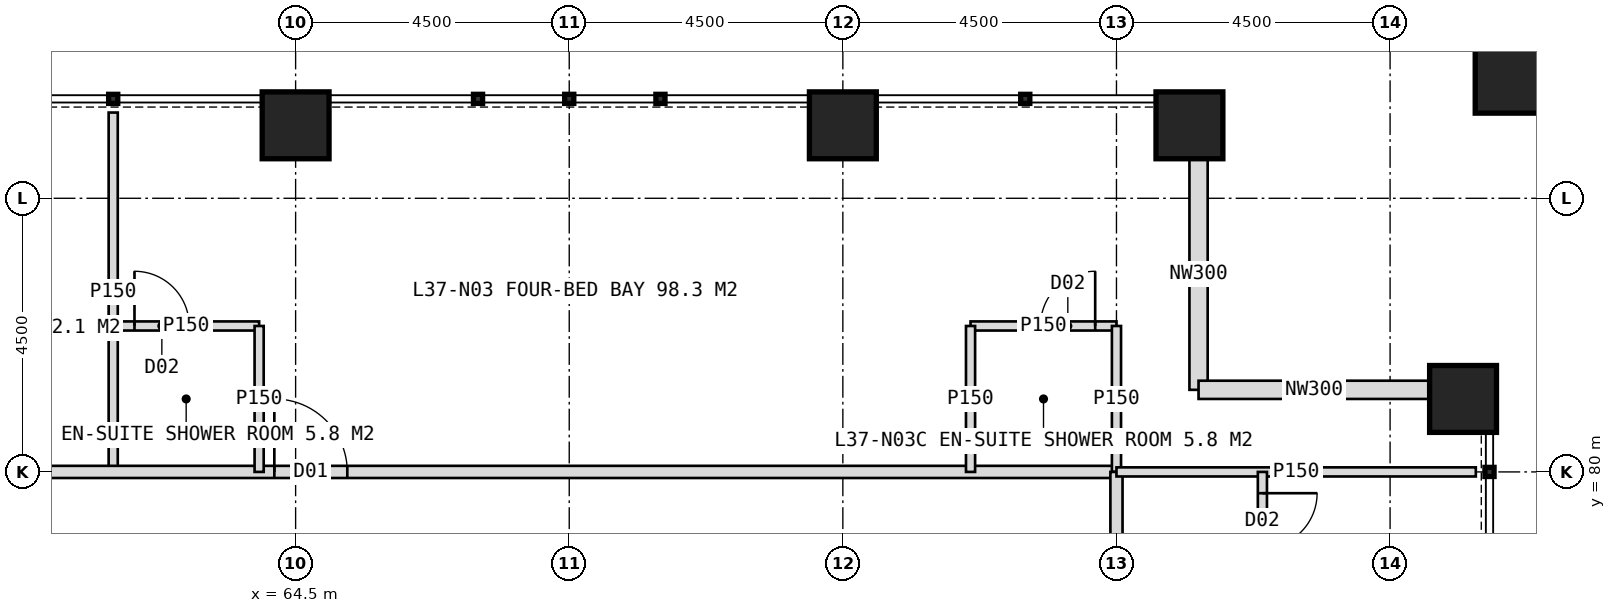
"""IFC4 building model, lengths in metres.
Left out: names, types, materials, properties, quantities, classifications, styles, units other than length and angle.
Written with IfcOpenShell. Run it as: python <this file> out.ifc"""

import sys

from ifc_helpers import new_model, si_unit, direction, frame, frame_2d, origin, origin_2d, place, context, subcontext, project, spatial, rectangle, hollow_rectangle, extrude, element, fill, save


model = new_model("IFC4")
c1 = context("Model", 3, precision=1e-05, world=origin(), true_north=direction((0.0, 1.0)))
c2 = subcontext(c1, "Body", "Model", "MODEL_VIEW")
j1 = project(units=[si_unit("LENGTHUNIT", "METRE"), si_unit("PLANEANGLEUNIT", "RADIAN")], contexts=[c1])
p1 = place(None, origin())
s1 = spatial("IfcSite", under=j1, at=p1, CompositionType="ELEMENT")
p2 = place(p1, origin())
s2 = spatial("IfcBuilding", under=s1, at=p2, CompositionType="ELEMENT")
p3 = place(p2, frame((0.0, 0.0, 156.0)))
s3 = spatial("IfcBuildingStorey", under=s2, at=p3, CompositionType="ELEMENT", Elevation=156.0)
for number, where, z_axis, x_axis in (
    (1, (64.5, 85.7, 0.0), (0.0, 0.0, 1.0), (1.0, 0.0, 0.0)),
    (2, (73.5, 85.7, 0.0), (0.0, 0.0, 1.0), (1.0, 0.0, 0.0)),
    (3, (79.2, 85.7, 0.0), (0.0, 0.0, 1.0), (1.0, 0.0, 0.0)),
    (4, (83.7, 81.2, 0.0), (0.0, 0.0, 1.0), (1.0, 0.0, 0.0)),
):
    element("IfcColumn", number, at=place(p3, frame(where, z_axis=z_axis, x_axis=x_axis)), inside=s3, PredefinedType="COLUMN", context=c2, shape_type="SweptSolid", body=[
        extrude(hollow_rectangle(XDim=1.1, YDim=1.1, WallThickness=0.1, at=origin_2d()), origin(), (0.0, 0.0, 1.0), 4.0),
    ])
p4 = place(p3, frame((84.6, 86.6, 0.0), z_axis=(0.0, 0.0, 1.0), x_axis=(1.0, 0.0, 0.0)))
e5 = element("IfcColumn", 5, at=p4, inside=s3, PredefinedType="COLUMN", context=c2, shape_type="SweptSolid", body=[
    extrude(hollow_rectangle(XDim=1.4, YDim=1.4, WallThickness=0.08, at=origin_2d()), origin(), (0.0, 0.0, 1.0), 4.0),
])
for number, where, z_axis, x_axis in (
    (6, (79.35, 85.15, 0.0), (0.0, 0.0, 1.0), (0.0, -1.0, 0.0)),
    (7, (79.35, 81.35, 0.0), (0.0, 0.0, 1.0), (1.0, 0.0, 0.0)),
):
    element("IfcWall", number, at=place(p3, frame(where, z_axis=z_axis, x_axis=x_axis)), inside=s3, PredefinedType="ELEMENTEDWALL", context=c2, shape_type="SweptSolid", body=[
        extrude(rectangle(XDim=3.8, YDim=0.3, at=frame_2d((1.9, 0.0))), origin(), (0.0, 0.0, 1.0), 4.0),
    ])
p5 = place(p3, frame((61.5, 80.0, 0.0), z_axis=(0.0, 0.0, 1.0), x_axis=(0.0, 1.0, 0.0)))
e8 = element("IfcWall", 8, at=p5, inside=s3, PredefinedType="PARTITIONING", context=c2, shape_type="SweptSolid", body=[
    extrude(rectangle(XDim=5.91, YDim=0.15, at=frame_2d((2.955, 0.0))), origin(), (0.0, 0.0, 1.0), 3.75),
])
p6 = place(p3, frame((42.0, 80.0, 0.0), z_axis=(0.0, 0.0, 1.0), x_axis=(1.0, 0.0, 0.0)))
e9 = element("IfcWall", 9, at=p6, inside=s3, PredefinedType="PARTITIONING", context=c2, shape_type="SweptSolid", body=[
    extrude(rectangle(XDim=36.0, YDim=0.2, at=frame_2d((18.0, 0.0))), origin(), (0.0, 0.0, 1.0), 3.75),
])
p7 = place(p6, frame((3.25, 0.0, 0.0)))
e10 = element("IfcOpeningElement", 10, at=p7, cuts=e9, PredefinedType="OPENING", context=c2, shape_type="SweptSolid", body=[
    extrude(rectangle(XDim=1.2, YDim=2.2, at=frame_2d((0.6, 1.1))), frame((0.0, 0.11, 0.0), z_axis=(0.0, -1.0, 0.0), x_axis=(1.0, 0.0, 0.0)), (0.0, 0.0, 1.0), 0.22),
])
p8 = place(p6, frame((13.75, 0.0, 0.0)))
e11 = element("IfcOpeningElement", 11, at=p8, cuts=e9, PredefinedType="OPENING", context=c2, shape_type="SweptSolid", body=[
    extrude(rectangle(XDim=1.0, YDim=2.1, at=frame_2d((0.5, 1.05))), frame((0.0, 0.11, 0.0), z_axis=(0.0, -1.0, 0.0), x_axis=(1.0, 0.0, 0.0)), (0.0, 0.0, 1.0), 0.22),
])
p9 = place(p6, frame((22.15, 0.0, 0.0)))
e12 = element("IfcOpeningElement", 12, at=p9, cuts=e9, PredefinedType="OPENING", context=c2, shape_type="SweptSolid", body=[
    extrude(rectangle(XDim=1.2, YDim=2.2, at=frame_2d((0.6, 1.1))), frame((0.0, 0.11, 0.0), z_axis=(0.0, -1.0, 0.0), x_axis=(1.0, 0.0, 0.0)), (0.0, 0.0, 1.0), 0.22),
])
p10 = place(p3, frame((61.5, 82.4, 0.0), z_axis=(0.0, 0.0, 1.0), x_axis=(1.0, 0.0, 0.0)))
e13 = element("IfcWall", 13, at=p10, inside=s3, PredefinedType="PARTITIONING", context=c2, shape_type="SweptSolid", body=[
    extrude(rectangle(XDim=2.4, YDim=0.15, at=frame_2d((1.2, 0.0))), origin(), (0.0, 0.0, 1.0), 3.75),
])
p11 = place(p10, frame((0.35, 0.0, 0.0)))
e14 = element("IfcOpeningElement", 14, at=p11, cuts=e13, PredefinedType="OPENING", context=c2, shape_type="SweptSolid", body=[
    extrude(rectangle(XDim=0.9, YDim=2.1, at=frame_2d((0.45, 1.05))), frame((0.0, 0.085, 0.0), z_axis=(0.0, -1.0, 0.0), x_axis=(1.0, 0.0, 0.0)), (0.0, 0.0, 1.0), 0.17),
])
p12 = place(p3, frame((63.9, 80.0, 0.0), z_axis=(0.0, 0.0, 1.0), x_axis=(0.0, 1.0, 0.0)))
e15 = element("IfcWall", 15, at=p12, inside=s3, PredefinedType="PARTITIONING", context=c2, shape_type="SweptSolid", body=[
    extrude(rectangle(XDim=2.4, YDim=0.15, at=frame_2d((1.2, 0.0))), origin(), (0.0, 0.0, 1.0), 3.75),
])
p13 = place(p3, frame((75.6, 82.4, 0.0), z_axis=(0.0, 0.0, 1.0), x_axis=(1.0, 0.0, 0.0)))
e16 = element("IfcWall", 16, at=p13, inside=s3, PredefinedType="PARTITIONING", context=c2, shape_type="SweptSolid", body=[
    extrude(rectangle(XDim=2.4, YDim=0.15, at=frame_2d((1.2, 0.0))), origin(), (0.0, 0.0, 1.0), 3.75),
])
p14 = place(p13, frame((1.15, 0.0, 0.0)))
e17 = element("IfcOpeningElement", 17, at=p14, cuts=e16, PredefinedType="OPENING", context=c2, shape_type="SweptSolid", body=[
    extrude(rectangle(XDim=0.9, YDim=2.1, at=frame_2d((0.45, 1.05))), frame((0.0, 0.085, 0.0), z_axis=(0.0, -1.0, 0.0), x_axis=(1.0, 0.0, 0.0)), (0.0, 0.0, 1.0), 0.17),
])
for number, where, z_axis, x_axis in (
    (18, (75.6, 80.0, 0.0), (0.0, 0.0, 1.0), (0.0, 1.0, 0.0)),
    (19, (78.0, 80.0, 0.0), (0.0, 0.0, 1.0), (0.0, 1.0, 0.0)),
):
    element("IfcWall", number, at=place(p3, frame(where, z_axis=z_axis, x_axis=x_axis)), inside=s3, PredefinedType="PARTITIONING", context=c2, shape_type="SweptSolid", body=[
        extrude(rectangle(XDim=2.4, YDim=0.15, at=frame_2d((1.2, 0.0))), origin(), (0.0, 0.0, 1.0), 3.75),
    ])
p15 = place(p3, frame((78.0, 80.0, 0.0), z_axis=(0.0, 0.0, 1.0), x_axis=(0.0, -1.0, 0.0)))
e20 = element("IfcWall", 20, at=p15, inside=s3, PredefinedType="PARTITIONING", context=c2, shape_type="SweptSolid", body=[
    extrude(rectangle(XDim=36.0, YDim=0.2, at=frame_2d((18.0, 0.0))), origin(), (0.0, 0.0, 1.0), 3.75),
])
p16 = place(p15, frame((3.25, 0.0, 0.0)))
e21 = element("IfcOpeningElement", 21, at=p16, cuts=e20, PredefinedType="OPENING", context=c2, shape_type="SweptSolid", body=[
    extrude(rectangle(XDim=1.2, YDim=2.2, at=frame_2d((0.6, 1.1))), frame((0.0, 0.11, 0.0), z_axis=(0.0, -1.0, 0.0), x_axis=(1.0, 0.0, 0.0)), (0.0, 0.0, 1.0), 0.22),
])
p17 = place(p15, frame((10.75, 0.0, 0.0)))
e22 = element("IfcOpeningElement", 22, at=p17, cuts=e20, PredefinedType="OPENING", context=c2, shape_type="SweptSolid", body=[
    extrude(rectangle(XDim=1.2, YDim=2.2, at=frame_2d((0.6, 1.1))), frame((0.0, 0.11, 0.0), z_axis=(0.0, -1.0, 0.0), x_axis=(1.0, 0.0, 0.0)), (0.0, 0.0, 1.0), 0.22),
])
p18 = place(p15, frame((21.25, 0.0, 0.0)))
e23 = element("IfcOpeningElement", 23, at=p18, cuts=e20, PredefinedType="OPENING", context=c2, shape_type="SweptSolid", body=[
    extrude(rectangle(XDim=1.2, YDim=2.2, at=frame_2d((0.6, 1.1))), frame((0.0, 0.11, 0.0), z_axis=(0.0, -1.0, 0.0), x_axis=(1.0, 0.0, 0.0)), (0.0, 0.0, 1.0), 0.22),
])
p19 = place(p15, frame((31.75, 0.0, 0.0)))
e24 = element("IfcOpeningElement", 24, at=p19, cuts=e20, PredefinedType="OPENING", context=c2, shape_type="SweptSolid", body=[
    extrude(rectangle(XDim=1.2, YDim=2.2, at=frame_2d((0.6, 1.1))), frame((0.0, 0.11, 0.0), z_axis=(0.0, -1.0, 0.0), x_axis=(1.0, 0.0, 0.0)), (0.0, 0.0, 1.0), 0.22),
])
p20 = place(p3, frame((78.0, 80.0, 0.0), z_axis=(0.0, 0.0, 1.0), x_axis=(1.0, 0.0, 0.0)))
e25 = element("IfcWall", 25, at=p20, inside=s3, PredefinedType="PARTITIONING", context=c2, shape_type="SweptSolid", body=[
    extrude(rectangle(XDim=5.91, YDim=0.15, at=frame_2d((2.955, 0.0))), origin(), (0.0, 0.0, 1.0), 3.75),
])
p21 = place(p3, frame((80.4, 80.0, 0.0), z_axis=(0.0, 0.0, 1.0), x_axis=(0.0, -1.0, 0.0)))
e26 = element("IfcWall", 26, at=p21, inside=s3, PredefinedType="PARTITIONING", context=c2, shape_type="SweptSolid", body=[
    extrude(rectangle(XDim=3.0, YDim=0.15, at=frame_2d((1.5, 0.0))), origin(), (0.0, 0.0, 1.0), 3.75),
])
p22 = place(p21, frame((0.35, 0.0, 0.0)))
e27 = element("IfcOpeningElement", 27, at=p22, cuts=e26, PredefinedType="OPENING", context=c2, shape_type="SweptSolid", body=[
    extrude(rectangle(XDim=0.9, YDim=2.1, at=frame_2d((0.45, 1.05))), frame((0.0, 0.085, 0.0), z_axis=(0.0, -1.0, 0.0), x_axis=(1.0, 0.0, 0.0)), (0.0, 0.0, 1.0), 0.17),
])
p23 = place(p9, origin())
e28 = element("IfcDoor", 28, at=p23, inside=s3, OperationType="SINGLE_SWING_LEFT", PredefinedType="DOOR", context=c2, shape_type="SweptSolid", body=[
    extrude(rectangle(XDim=1.2, YDim=2.2, at=frame_2d((0.6, 1.1))), frame((0.0, 0.025, 0.0), z_axis=(0.0, -1.0, 0.0), x_axis=(1.0, 0.0, 0.0)), (0.0, 0.0, 1.0), 0.05),
])
fill(e12, e28)
p24 = place(p11, origin())
e29 = element("IfcDoor", 29, at=p24, inside=s3, OperationType="SINGLE_SWING_LEFT", PredefinedType="DOOR", context=c2, shape_type="SweptSolid", body=[
    extrude(rectangle(XDim=0.9, YDim=2.1, at=frame_2d((0.45, 1.05))), frame((0.0, 0.025, 0.0), z_axis=(0.0, -1.0, 0.0), x_axis=(1.0, 0.0, 0.0)), (0.0, 0.0, 1.0), 0.05),
])
fill(e14, e29)
p25 = place(p14, origin())
e30 = element("IfcDoor", 30, at=p25, inside=s3, OperationType="SINGLE_SWING_RIGHT", PredefinedType="DOOR", context=c2, shape_type="SweptSolid", body=[
    extrude(rectangle(XDim=0.9, YDim=2.1, at=frame_2d((0.45, 1.05))), frame((0.0, 0.025, 0.0), z_axis=(0.0, -1.0, 0.0), x_axis=(1.0, 0.0, 0.0)), (0.0, 0.0, 1.0), 0.05),
])
fill(e17, e30)
p26 = place(p22, origin())
e31 = element("IfcDoor", 31, at=p26, inside=s3, OperationType="SINGLE_SWING_LEFT", PredefinedType="DOOR", context=c2, shape_type="SweptSolid", body=[
    extrude(rectangle(XDim=0.9, YDim=2.1, at=frame_2d((0.45, 1.05))), frame((0.0, 0.025, 0.0), z_axis=(0.0, -1.0, 0.0), x_axis=(1.0, 0.0, 0.0)), (0.0, 0.0, 1.0), 0.05),
])
fill(e27, e31)
save(model, sys.argv[1])
